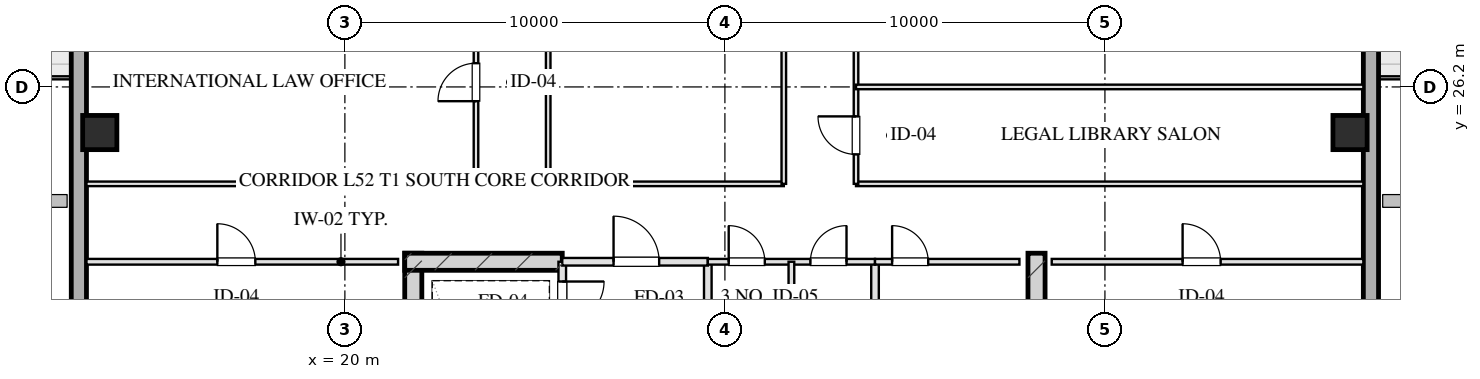
"""IFC4 building model, lengths in metres.
Left out: names, types, materials, properties, quantities, classifications, styles, units other than length and angle.
Written with IfcOpenShell. Run it as: python <this file> out.ifc"""

import sys

from ifc_helpers import new_model, si_unit, direction, frame, frame_2d, origin, origin_2d, place, context, subcontext, project, spatial, rectangle, hollow_rectangle, extrude, element, fill, save


model = new_model("IFC4")
c1 = context("Model", 3, precision=1e-05, world=origin(), true_north=direction((0.0, 1.0)))
c2 = subcontext(c1, "Body", "Model", "MODEL_VIEW")
j1 = project(units=[si_unit("LENGTHUNIT", "METRE"), si_unit("PLANEANGLEUNIT", "RADIAN")], contexts=[c1])
p1 = place(None, origin())
s1 = spatial("IfcSite", under=j1, at=p1, CompositionType="ELEMENT")
p2 = place(p1, origin())
s2 = spatial("IfcBuilding", under=s1, at=p2, CompositionType="ELEMENT")
p3 = place(p2, frame((0.0, 0.0, 195.5)))
s3 = spatial("IfcBuildingStorey", under=s2, at=p3, CompositionType="ELEMENT", Elevation=195.5)
for number, where, z_axis, x_axis in (
    (1, (21.8, 21.825, 0.0), (0.0, 0.0, 1.0), (0.0, -1.0, 0.0)),
    (2, (38.2, 21.825, 0.0), (0.0, 0.0, 1.0), (0.0, -1.0, 0.0)),
):
    element("IfcWall", number, at=place(p3, frame(where, z_axis=z_axis, x_axis=x_axis)), inside=s3, PredefinedType="SHEAR", context=c2, shape_type="SweptSolid", body=[
        extrude(rectangle(XDim=9.33, YDim=0.45, at=frame_2d((4.665, 0.0))), origin(), (0.0, 0.0, 1.0), 3.45),
    ])
p4 = place(p3, frame((21.575, 21.6, 0.0), z_axis=(0.0, 0.0, 1.0), x_axis=(1.0, 0.0, 0.0)))
e3 = element("IfcWall", 3, at=p4, inside=s3, PredefinedType="SHEAR", context=c2, shape_type="SweptSolid", body=[
    extrude(rectangle(XDim=4.145, YDim=0.45, at=frame_2d((2.073, 0.0))), origin(), (0.0, 0.0, 1.0), 3.45),
])
for number, where, z_axis, x_axis in (
    (4, (13.55, 25.0, 0.0), (0.0, 0.0, 1.0), (1.0, 0.0, 0.0)),
    (5, (46.45, 25.0, 0.0), (0.0, 0.0, 1.0), (1.0, 0.0, 0.0)),
):
    element("IfcColumn", number, at=place(p3, frame(where, z_axis=z_axis, x_axis=x_axis)), inside=s3, PredefinedType="COLUMN", context=c2, shape_type="SweptSolid", body=[
        extrude(hollow_rectangle(XDim=0.9, YDim=0.9, WallThickness=0.032, at=origin_2d()), origin(), (0.0, 0.0, 1.0), 3.451),
    ])
p5 = place(p3, frame((13.0, 10.8, 0.0), z_axis=(0.0, 0.0, 1.0), x_axis=(0.0, 1.0, 0.0)))
e6 = element("IfcWall", 6, at=p5, inside=s3, PredefinedType="SOLIDWALL", context=c2, shape_type="SweptSolid", body=[
    extrude(rectangle(XDim=46.4, YDim=0.4, at=frame_2d((23.2, 0.0))), origin(), (0.0, 0.0, 1.0), 2.61),
])
p6 = place(p5, frame((24.75, 0.0, 0.75)))
e7 = element("IfcOpeningElement", 7, at=p6, cuts=e6, PredefinedType="OPENING", context=c2, shape_type="SweptSolid", body=[
    extrude(rectangle(XDim=2.1, YDim=1.46, at=frame_2d((1.05, 0.73))), frame((0.0, 0.21, 0.0), z_axis=(0.0, -1.0, 0.0), x_axis=(1.0, 0.0, 0.0)), (0.0, 0.0, 1.0), 0.42),
])
p7 = place(p5, frame((28.55, 0.0, 0.75)))
e8 = element("IfcOpeningElement", 8, at=p7, cuts=e6, PredefinedType="OPENING", context=c2, shape_type="SweptSolid", body=[
    extrude(rectangle(XDim=2.1, YDim=1.46, at=frame_2d((1.05, 0.73))), frame((0.0, 0.21, 0.0), z_axis=(0.0, -1.0, 0.0), x_axis=(1.0, 0.0, 0.0)), (0.0, 0.0, 1.0), 0.42),
])
p8 = place(p5, frame((19.55, 0.0, 0.0)))
e9 = element("IfcOpeningElement", 9, at=p8, cuts=e6, PredefinedType="OPENING", context=c2, shape_type="SweptSolid", body=[
    extrude(rectangle(XDim=1.1, YDim=2.15, at=frame_2d((0.55, 1.075))), frame((0.0, 0.21, 0.0), z_axis=(0.0, -1.0, 0.0), x_axis=(1.0, 0.0, 0.0)), (0.0, 0.0, 1.0), 0.42),
])
p9 = place(p3, frame((47.0, 57.2, 0.0), z_axis=(0.0, 0.0, 1.0), x_axis=(0.0, -1.0, 0.0)))
e10 = element("IfcWall", 10, at=p9, inside=s3, PredefinedType="SOLIDWALL", context=c2, shape_type="SweptSolid", body=[
    extrude(rectangle(XDim=46.4, YDim=0.4, at=frame_2d((23.2, 0.0))), origin(), (0.0, 0.0, 1.0), 2.61),
])
p10 = place(p9, frame((19.55, 0.0, 0.75)))
e11 = element("IfcOpeningElement", 11, at=p10, cuts=e10, PredefinedType="OPENING", context=c2, shape_type="SweptSolid", body=[
    extrude(rectangle(XDim=2.1, YDim=1.46, at=frame_2d((1.05, 0.73))), frame((0.0, 0.21, 0.0), z_axis=(0.0, -1.0, 0.0), x_axis=(1.0, 0.0, 0.0)), (0.0, 0.0, 1.0), 0.42),
])
p11 = place(p9, frame((15.75, 0.0, 0.75)))
e12 = element("IfcOpeningElement", 12, at=p11, cuts=e10, PredefinedType="OPENING", context=c2, shape_type="SweptSolid", body=[
    extrude(rectangle(XDim=2.1, YDim=1.46, at=frame_2d((1.05, 0.73))), frame((0.0, 0.21, 0.0), z_axis=(0.0, -1.0, 0.0), x_axis=(1.0, 0.0, 0.0)), (0.0, 0.0, 1.0), 0.42),
])
p12 = place(p9, frame((27.05, 0.0, 0.0)))
e13 = element("IfcOpeningElement", 13, at=p12, cuts=e10, PredefinedType="OPENING", context=c2, shape_type="SweptSolid", body=[
    extrude(rectangle(XDim=1.1, YDim=2.15, at=frame_2d((0.55, 1.075))), frame((0.0, 0.21, 0.0), z_axis=(0.0, -1.0, 0.0), x_axis=(1.0, 0.0, 0.0)), (0.0, 0.0, 1.0), 0.42),
])
p13 = place(p3, frame((25.72, 21.6, 0.0), z_axis=(0.0, 0.0, 1.0), x_axis=(0.0, -1.0, 0.0)))
e14 = element("IfcWall", 14, at=p13, inside=s3, PredefinedType="PARTITIONING", context=c2, shape_type="SweptSolid", body=[
    extrude(rectangle(XDim=1.9, YDim=0.2, at=frame_2d((0.95, 0.0))), origin(), (0.0, 0.0, 1.0), 3.175),
])
p14 = place(p13, frame((0.52, 0.0, 0.0)))
e15 = element("IfcOpeningElement", 15, at=p14, cuts=e14, PredefinedType="OPENING", context=c2, shape_type="SweptSolid", body=[
    extrude(rectangle(XDim=1.1, YDim=2.05, at=frame_2d((0.55, 1.025))), frame((0.0, 0.11, 0.0), z_axis=(0.0, -1.0, 0.0), x_axis=(1.0, 0.0, 0.0)), (0.0, 0.0, 1.0), 0.22),
])
p15 = place(p3, frame((29.55, 21.6, 0.0), z_axis=(0.0, 0.0, 1.0), x_axis=(0.0, -1.0, 0.0)))
e16 = element("IfcWall", 16, at=p15, inside=s3, PredefinedType="PARTITIONING", context=c2, shape_type="SweptSolid", body=[
    extrude(rectangle(XDim=8.43, YDim=0.2, at=frame_2d((4.215, 0.0))), origin(), (0.0, 0.0, 1.0), 3.175),
])
p16 = place(p3, frame((25.72, 21.6, 0.0), z_axis=(0.0, 0.0, 1.0), x_axis=(1.0, 0.0, 0.0)))
e17 = element("IfcWall", 17, at=p16, inside=s3, PredefinedType="PARTITIONING", context=c2, shape_type="SweptSolid", body=[
    extrude(rectangle(XDim=3.83, YDim=0.2, at=frame_2d((1.915, 0.0))), origin(), (0.0, 0.0, 1.0), 3.175),
])
p17 = place(p16, frame((1.35, 0.0, 0.0)))
e18 = element("IfcOpeningElement", 18, at=p17, cuts=e17, PredefinedType="OPENING", context=c2, shape_type="SweptSolid", body=[
    extrude(rectangle(XDim=1.2, YDim=2.05, at=frame_2d((0.6, 1.025))), frame((0.0, 0.11, 0.0), z_axis=(0.0, -1.0, 0.0), x_axis=(1.0, 0.0, 0.0)), (0.0, 0.0, 1.0), 0.22),
])
p18 = place(p3, frame((33.95, 21.6, 0.0), z_axis=(0.0, 0.0, 1.0), x_axis=(0.0, -1.0, 0.0)))
e19 = element("IfcWall", 19, at=p18, inside=s3, PredefinedType="PARTITIONING", context=c2, shape_type="SweptSolid", body=[
    extrude(rectangle(XDim=8.43, YDim=0.2, at=frame_2d((4.215, 0.0))), origin(), (0.0, 0.0, 1.0), 3.175),
])
p19 = place(p3, frame((29.55, 21.6, 0.0), z_axis=(0.0, 0.0, 1.0), x_axis=(1.0, 0.0, 0.0)))
e20 = element("IfcWall", 20, at=p19, inside=s3, PredefinedType="PARTITIONING", context=c2, shape_type="SweptSolid", body=[
    extrude(rectangle(XDim=4.4, YDim=0.15, at=frame_2d((2.2, 0.0))), origin(), (0.0, 0.0, 1.0), 3.175),
])
p20 = place(p19, frame((0.55, 0.0, 0.0)))
e21 = element("IfcOpeningElement", 21, at=p20, cuts=e20, PredefinedType="OPENING", context=c2, shape_type="SweptSolid", body=[
    extrude(rectangle(XDim=0.95, YDim=2.05, at=frame_2d((0.475, 1.025))), frame((0.0, 0.085, 0.0), z_axis=(0.0, -1.0, 0.0), x_axis=(1.0, 0.0, 0.0)), (0.0, 0.0, 1.0), 0.17),
])
p21 = place(p19, frame((2.7, 0.0, 0.0)))
e22 = element("IfcOpeningElement", 22, at=p21, cuts=e20, PredefinedType="OPENING", context=c2, shape_type="SweptSolid", body=[
    extrude(rectangle(XDim=0.95, YDim=2.05, at=frame_2d((0.475, 1.025))), frame((0.0, 0.085, 0.0), z_axis=(0.0, -1.0, 0.0), x_axis=(1.0, 0.0, 0.0)), (0.0, 0.0, 1.0), 0.17),
])
p22 = place(p3, frame((31.75, 21.6, 0.0), z_axis=(0.0, 0.0, 1.0), x_axis=(0.0, -1.0, 0.0)))
e23 = element("IfcWall", 23, at=p22, inside=s3, PredefinedType="PARTITIONING", context=c2, shape_type="SweptSolid", body=[
    extrude(rectangle(XDim=8.43, YDim=0.15, at=frame_2d((4.215, 0.0))), origin(), (0.0, 0.0, 1.0), 3.175),
])
p23 = place(p3, frame((33.95, 21.6, 0.0), z_axis=(0.0, 0.0, 1.0), x_axis=(1.0, 0.0, 0.0)))
e24 = element("IfcWall", 24, at=p23, inside=s3, PredefinedType="PARTITIONING", context=c2, shape_type="SweptSolid", body=[
    extrude(rectangle(XDim=3.8, YDim=0.15, at=frame_2d((1.9, 0.0))), origin(), (0.0, 0.0, 1.0), 3.175),
])
p24 = place(p23, frame((0.45, 0.0, 0.0)))
e25 = element("IfcOpeningElement", 25, at=p24, cuts=e24, PredefinedType="OPENING", context=c2, shape_type="SweptSolid", body=[
    extrude(rectangle(XDim=0.95, YDim=2.05, at=frame_2d((0.475, 1.025))), frame((0.0, 0.085, 0.0), z_axis=(0.0, -1.0, 0.0), x_axis=(1.0, 0.0, 0.0)), (0.0, 0.0, 1.0), 0.17),
])
p25 = place(p3, frame((13.2, 21.6, 0.0), z_axis=(0.0, 0.0, 1.0), x_axis=(1.0, 0.0, 0.0)))
e26 = element("IfcWall", 26, at=p25, inside=s3, PredefinedType="PARTITIONING", context=c2, shape_type="SweptSolid", body=[
    extrude(rectangle(XDim=8.2, YDim=0.15, at=frame_2d((4.1, 0.0))), origin(), (0.0, 0.0, 1.0), 3.175),
])
p26 = place(p25, frame((3.444, 0.0, 0.0)))
e27 = element("IfcOpeningElement", 27, at=p26, cuts=e26, PredefinedType="OPENING", context=c2, shape_type="SweptSolid", body=[
    extrude(rectangle(XDim=1.0, YDim=2.05, at=frame_2d((0.5, 1.025))), frame((0.0, 0.085, 0.0), z_axis=(0.0, -1.0, 0.0), x_axis=(1.0, 0.0, 0.0)), (0.0, 0.0, 1.0), 0.17),
])
p27 = place(p3, frame((38.6, 21.6, 0.0), z_axis=(0.0, 0.0, 1.0), x_axis=(1.0, 0.0, 0.0)))
e28 = element("IfcWall", 28, at=p27, inside=s3, PredefinedType="PARTITIONING", context=c2, shape_type="SweptSolid", body=[
    extrude(rectangle(XDim=8.2, YDim=0.15, at=frame_2d((4.1, 0.0))), origin(), (0.0, 0.0, 1.0), 3.175),
])
p28 = place(p27, frame((3.444, 0.0, 0.0)))
e29 = element("IfcOpeningElement", 29, at=p28, cuts=e28, PredefinedType="OPENING", context=c2, shape_type="SweptSolid", body=[
    extrude(rectangle(XDim=1.0, YDim=2.05, at=frame_2d((0.5, 1.025))), frame((0.0, 0.085, 0.0), z_axis=(0.0, -1.0, 0.0), x_axis=(1.0, 0.0, 0.0)), (0.0, 0.0, 1.0), 0.17),
])
p29 = place(p3, frame((13.2, 23.65, 0.0), z_axis=(0.0, 0.0, 1.0), x_axis=(1.0, 0.0, 0.0)))
e30 = element("IfcWall", 30, at=p29, inside=s3, PredefinedType="PARTITIONING", context=c2, shape_type="SweptSolid", body=[
    extrude(rectangle(XDim=10.25, YDim=0.12, at=frame_2d((5.125, 0.0))), origin(), (0.0, 0.0, 1.0), 3.175),
])
p30 = place(p3, frame((25.35, 23.65, 0.0), z_axis=(0.0, 0.0, 1.0), x_axis=(1.0, 0.0, 0.0)))
e31 = element("IfcWall", 31, at=p30, inside=s3, PredefinedType="PARTITIONING", context=c2, shape_type="SweptSolid", body=[
    extrude(rectangle(XDim=6.2, YDim=0.12, at=frame_2d((3.1, 0.0))), origin(), (0.0, 0.0, 1.0), 3.175),
])
p31 = place(p3, frame((33.45, 23.65, 0.0), z_axis=(0.0, 0.0, 1.0), x_axis=(1.0, 0.0, 0.0)))
e32 = element("IfcWall", 32, at=p31, inside=s3, PredefinedType="PARTITIONING", context=c2, shape_type="SweptSolid", body=[
    extrude(rectangle(XDim=13.35, YDim=0.12, at=frame_2d((6.675, 0.0))), origin(), (0.0, 0.0, 1.0), 3.175),
])
p32 = place(p3, frame((23.45, 23.65, 0.0), z_axis=(0.0, 0.0, 1.0), x_axis=(0.0, 1.0, 0.0)))
e33 = element("IfcWall", 33, at=p32, inside=s3, PredefinedType="PARTITIONING", context=c2, shape_type="SweptSolid", body=[
    extrude(rectangle(XDim=20.7, YDim=0.12, at=frame_2d((10.35, 0.0))), origin(), (0.0, 0.0, 1.0), 3.175),
])
p33 = place(p32, frame((2.175, 0.0, 0.0)))
e34 = element("IfcOpeningElement", 34, at=p33, cuts=e33, PredefinedType="OPENING", context=c2, shape_type="SweptSolid", body=[
    extrude(rectangle(XDim=1.0, YDim=2.05, at=frame_2d((0.5, 1.025))), frame((0.0, 0.07, 0.0), z_axis=(0.0, -1.0, 0.0), x_axis=(1.0, 0.0, 0.0)), (0.0, 0.0, 1.0), 0.14),
])
p34 = place(p32, frame((6.883, 0.0, 0.0)))
e35 = element("IfcOpeningElement", 35, at=p34, cuts=e33, PredefinedType="OPENING", context=c2, shape_type="SweptSolid", body=[
    extrude(rectangle(XDim=1.0, YDim=2.05, at=frame_2d((0.5, 1.025))), frame((0.0, 0.07, 0.0), z_axis=(0.0, -1.0, 0.0), x_axis=(1.0, 0.0, 0.0)), (0.0, 0.0, 1.0), 0.14),
])
p35 = place(p32, frame((11.502, 0.0, 0.0)))
e36 = element("IfcOpeningElement", 36, at=p35, cuts=e33, PredefinedType="OPENING", context=c2, shape_type="SweptSolid", body=[
    extrude(rectangle(XDim=1.05, YDim=2.05, at=frame_2d((0.525, 1.025))), frame((0.0, 0.07, 0.0), z_axis=(0.0, -1.0, 0.0), x_axis=(1.0, 0.0, 0.0)), (0.0, 0.0, 1.0), 0.14),
])
p36 = place(p32, frame((17.145, 0.0, 0.0)))
e37 = element("IfcOpeningElement", 37, at=p36, cuts=e33, PredefinedType="OPENING", context=c2, shape_type="SweptSolid", body=[
    extrude(rectangle(XDim=1.0, YDim=2.05, at=frame_2d((0.5, 1.025))), frame((0.0, 0.07, 0.0), z_axis=(0.0, -1.0, 0.0), x_axis=(1.0, 0.0, 0.0)), (0.0, 0.0, 1.0), 0.14),
])
p37 = place(p3, frame((25.35, 23.65, 0.0), z_axis=(0.0, 0.0, 1.0), x_axis=(0.0, 1.0, 0.0)))
e38 = element("IfcWall", 38, at=p37, inside=s3, PredefinedType="PARTITIONING", context=c2, shape_type="SweptSolid", body=[
    extrude(rectangle(XDim=20.7, YDim=0.12, at=frame_2d((10.35, 0.0))), origin(), (0.0, 0.0, 1.0), 3.175),
])
p38 = place(p37, frame((4.963, 0.0, 0.0)))
e39 = element("IfcOpeningElement", 39, at=p38, cuts=e38, PredefinedType="OPENING", context=c2, shape_type="SweptSolid", body=[
    extrude(rectangle(XDim=1.1, YDim=2.05, at=frame_2d((0.55, 1.025))), frame((0.0, 0.07, 0.0), z_axis=(0.0, -1.0, 0.0), x_axis=(1.0, 0.0, 0.0)), (0.0, 0.0, 1.0), 0.14),
])
p39 = place(p37, frame((15.382, 0.0, 0.0)))
e40 = element("IfcOpeningElement", 40, at=p39, cuts=e38, PredefinedType="OPENING", context=c2, shape_type="SweptSolid", body=[
    extrude(rectangle(XDim=1.1, YDim=2.05, at=frame_2d((0.55, 1.025))), frame((0.0, 0.07, 0.0), z_axis=(0.0, -1.0, 0.0), x_axis=(1.0, 0.0, 0.0)), (0.0, 0.0, 1.0), 0.14),
])
p40 = place(p3, frame((31.55, 23.65, 0.0), z_axis=(0.0, 0.0, 1.0), x_axis=(0.0, 1.0, 0.0)))
e41 = element("IfcWall", 41, at=p40, inside=s3, PredefinedType="PARTITIONING", context=c2, shape_type="SweptSolid", body=[
    extrude(rectangle(XDim=20.7, YDim=0.12, at=frame_2d((10.35, 0.0))), origin(), (0.0, 0.0, 1.0), 3.175),
])
p41 = place(p3, frame((33.45, 23.65, 0.0), z_axis=(0.0, 0.0, 1.0), x_axis=(0.0, 1.0, 0.0)))
e42 = element("IfcWall", 42, at=p41, inside=s3, PredefinedType="PARTITIONING", context=c2, shape_type="SweptSolid", body=[
    extrude(rectangle(XDim=20.7, YDim=0.12, at=frame_2d((10.35, 0.0))), origin(), (0.0, 0.0, 1.0), 3.175),
])
p42 = place(p41, frame((0.775, 0.0, 0.0)))
e43 = element("IfcOpeningElement", 43, at=p42, cuts=e42, PredefinedType="OPENING", context=c2, shape_type="SweptSolid", body=[
    extrude(rectangle(XDim=1.0, YDim=2.05, at=frame_2d((0.5, 1.025))), frame((0.0, 0.07, 0.0), z_axis=(0.0, -1.0, 0.0), x_axis=(1.0, 0.0, 0.0)), (0.0, 0.0, 1.0), 0.14),
])
p43 = place(p41, frame((5.35, 0.0, 0.0)))
e44 = element("IfcOpeningElement", 44, at=p43, cuts=e42, PredefinedType="OPENING", context=c2, shape_type="SweptSolid", body=[
    extrude(rectangle(XDim=1.0, YDim=2.05, at=frame_2d((0.5, 1.025))), frame((0.0, 0.07, 0.0), z_axis=(0.0, -1.0, 0.0), x_axis=(1.0, 0.0, 0.0)), (0.0, 0.0, 1.0), 0.14),
])
p44 = place(p41, frame((9.85, 0.0, 0.0)))
e45 = element("IfcOpeningElement", 45, at=p44, cuts=e42, PredefinedType="OPENING", context=c2, shape_type="SweptSolid", body=[
    extrude(rectangle(XDim=1.0, YDim=2.05, at=frame_2d((0.5, 1.025))), frame((0.0, 0.07, 0.0), z_axis=(0.0, -1.0, 0.0), x_axis=(1.0, 0.0, 0.0)), (0.0, 0.0, 1.0), 0.14),
])
p45 = place(p41, frame((12.95, 0.0, 0.0)))
e46 = element("IfcOpeningElement", 46, at=p45, cuts=e42, PredefinedType="OPENING", context=c2, shape_type="SweptSolid", body=[
    extrude(rectangle(XDim=1.05, YDim=2.05, at=frame_2d((0.525, 1.025))), frame((0.0, 0.07, 0.0), z_axis=(0.0, -1.0, 0.0), x_axis=(1.0, 0.0, 0.0)), (0.0, 0.0, 1.0), 0.14),
])
p46 = place(p41, frame((17.525, 0.0, 0.0)))
e47 = element("IfcOpeningElement", 47, at=p46, cuts=e42, PredefinedType="OPENING", context=c2, shape_type="SweptSolid", body=[
    extrude(rectangle(XDim=1.0, YDim=2.05, at=frame_2d((0.5, 1.025))), frame((0.0, 0.07, 0.0), z_axis=(0.0, -1.0, 0.0), x_axis=(1.0, 0.0, 0.0)), (0.0, 0.0, 1.0), 0.14),
])
p47 = place(p3, frame((33.45, 26.2, 0.0), z_axis=(0.0, 0.0, 1.0), x_axis=(1.0, 0.0, 0.0)))
e48 = element("IfcWall", 48, at=p47, inside=s3, PredefinedType="PARTITIONING", context=c2, shape_type="SweptSolid", body=[
    extrude(rectangle(XDim=13.35, YDim=0.12, at=frame_2d((6.675, 0.0))), origin(), (0.0, 0.0, 1.0), 3.175),
])
p48 = place(p14, origin())
e49 = element("IfcDoor", 49, at=p48, inside=s3, OperationType="SINGLE_SWING_LEFT", PredefinedType="DOOR", context=c2, shape_type="SweptSolid", body=[
    extrude(rectangle(XDim=1.1, YDim=2.05, at=frame_2d((0.55, 1.025))), frame((0.0, 0.025, 0.0), z_axis=(0.0, -1.0, 0.0), x_axis=(1.0, 0.0, 0.0)), (0.0, 0.0, 1.0), 0.05),
])
fill(e15, e49)
p49 = place(p17, origin())
e50 = element("IfcDoor", 50, at=p49, inside=s3, OperationType="SINGLE_SWING_LEFT", PredefinedType="DOOR", context=c2, shape_type="SweptSolid", body=[
    extrude(rectangle(XDim=1.2, YDim=2.05, at=frame_2d((0.6, 1.025))), frame((0.0, 0.025, 0.0), z_axis=(0.0, -1.0, 0.0), x_axis=(1.0, 0.0, 0.0)), (0.0, 0.0, 1.0), 0.05),
])
fill(e18, e50)
p50 = place(p20, origin())
e51 = element("IfcDoor", 51, at=p50, inside=s3, OperationType="SINGLE_SWING_LEFT", PredefinedType="DOOR", context=c2, shape_type="SweptSolid", body=[
    extrude(rectangle(XDim=0.95, YDim=2.05, at=frame_2d((0.475, 1.025))), frame((0.0, 0.025, 0.0), z_axis=(0.0, -1.0, 0.0), x_axis=(1.0, 0.0, 0.0)), (0.0, 0.0, 1.0), 0.05),
])
fill(e21, e51)
p51 = place(p21, origin())
e52 = element("IfcDoor", 52, at=p51, inside=s3, OperationType="SINGLE_SWING_RIGHT", PredefinedType="DOOR", context=c2, shape_type="SweptSolid", body=[
    extrude(rectangle(XDim=0.95, YDim=2.05, at=frame_2d((0.475, 1.025))), frame((0.0, 0.025, 0.0), z_axis=(0.0, -1.0, 0.0), x_axis=(1.0, 0.0, 0.0)), (0.0, 0.0, 1.0), 0.05),
])
fill(e22, e52)
p52 = place(p24, origin())
e53 = element("IfcDoor", 53, at=p52, inside=s3, OperationType="SINGLE_SWING_LEFT", PredefinedType="DOOR", context=c2, shape_type="SweptSolid", body=[
    extrude(rectangle(XDim=0.95, YDim=2.05, at=frame_2d((0.475, 1.025))), frame((0.0, 0.025, 0.0), z_axis=(0.0, -1.0, 0.0), x_axis=(1.0, 0.0, 0.0)), (0.0, 0.0, 1.0), 0.05),
])
fill(e25, e53)
p53 = place(p26, origin())
e54 = element("IfcDoor", 54, at=p53, inside=s3, OperationType="SINGLE_SWING_LEFT", PredefinedType="DOOR", context=c2, shape_type="SweptSolid", body=[
    extrude(rectangle(XDim=1.0, YDim=2.05, at=frame_2d((0.5, 1.025))), frame((0.0, 0.025, 0.0), z_axis=(0.0, -1.0, 0.0), x_axis=(1.0, 0.0, 0.0)), (0.0, 0.0, 1.0), 0.05),
])
fill(e27, e54)
p54 = place(p28, origin())
e55 = element("IfcDoor", 55, at=p54, inside=s3, OperationType="SINGLE_SWING_LEFT", PredefinedType="DOOR", context=c2, shape_type="SweptSolid", body=[
    extrude(rectangle(XDim=1.0, YDim=2.05, at=frame_2d((0.5, 1.025))), frame((0.0, 0.025, 0.0), z_axis=(0.0, -1.0, 0.0), x_axis=(1.0, 0.0, 0.0)), (0.0, 0.0, 1.0), 0.05),
])
fill(e29, e55)
p55 = place(p33, origin())
e56 = element("IfcDoor", 56, at=p55, inside=s3, OperationType="SINGLE_SWING_LEFT", PredefinedType="DOOR", context=c2, shape_type="SweptSolid", body=[
    extrude(rectangle(XDim=1.0, YDim=2.05, at=frame_2d((0.5, 1.025))), frame((0.0, 0.025, 0.0), z_axis=(0.0, -1.0, 0.0), x_axis=(1.0, 0.0, 0.0)), (0.0, 0.0, 1.0), 0.05),
])
fill(e34, e56)
p56 = place(p42, origin())
e57 = element("IfcDoor", 57, at=p56, inside=s3, OperationType="SINGLE_SWING_RIGHT", PredefinedType="DOOR", context=c2, shape_type="SweptSolid", body=[
    extrude(rectangle(XDim=1.0, YDim=2.05, at=frame_2d((0.5, 1.025))), frame((0.0, 0.025, 0.0), z_axis=(0.0, -1.0, 0.0), x_axis=(1.0, 0.0, 0.0)), (0.0, 0.0, 1.0), 0.05),
])
fill(e43, e57)
save(model, sys.argv[1])
